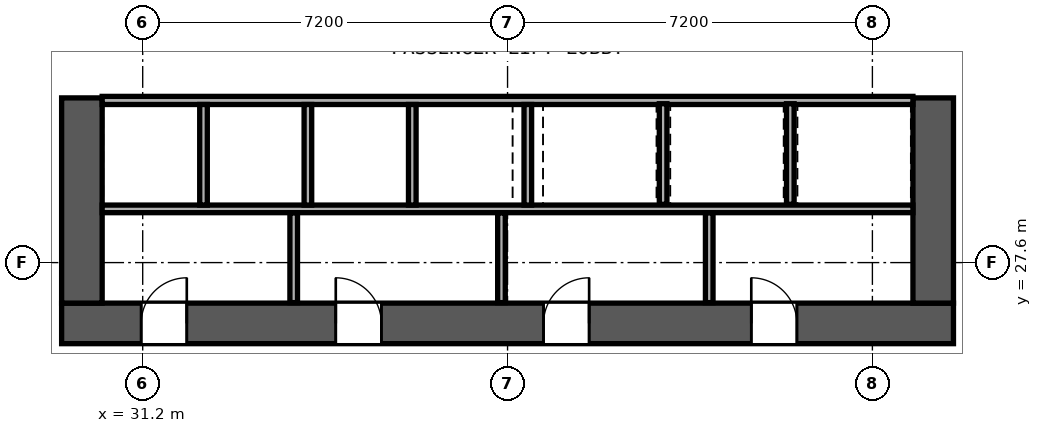
"""IFC4 building model, lengths in metres.
Left out: names, types, materials, properties, quantities, classifications, styles, units other than length and angle.
Written with IfcOpenShell. Run it as: python <this file> out.ifc"""

import sys

from ifc_helpers import new_model, si_unit, direction, frame, frame_2d, origin, place, context, subcontext, project, spatial, rectangle, extrude, element, fill, save


model = new_model("IFC4")
c1 = context("Model", 3, precision=1e-05, world=origin(), true_north=direction((0.0, 1.0)))
c2 = subcontext(c1, "Body", "Model", "MODEL_VIEW")
j1 = project(units=[si_unit("LENGTHUNIT", "METRE"), si_unit("PLANEANGLEUNIT", "RADIAN")], contexts=[c1])
p1 = place(None, origin())
s1 = spatial("IfcSite", under=j1, at=p1, CompositionType="ELEMENT")
p2 = place(p1, origin())
s2 = spatial("IfcBuilding", under=s1, at=p2, CompositionType="ELEMENT")
p3 = place(p2, frame((0.0, 0.0, 15.6)))
s3 = spatial("IfcBuildingStorey", under=s2, at=p3, CompositionType="ELEMENT", Elevation=15.6)
p4 = place(p3, frame((29.6, 26.4, 0.0), z_axis=(0.0, 0.0, 1.0), x_axis=(1.0, 0.0, 0.0)))
e1 = element("IfcWall", 1, at=p4, inside=s3, PredefinedType="SHEAR", context=c2, shape_type="SweptSolid", body=[
    extrude(rectangle(XDim=17.6, YDim=0.8, at=frame_2d((8.8, 0.0))), origin(), (0.0, 0.0, 1.0), 3.78),
])
p5 = place(p4, frame((2.47, 0.0, 0.0), z_axis=(0.0, 0.0, 1.0), x_axis=(-1.0, 0.0, 0.0)))
e2 = element("IfcOpeningElement", 2, at=p5, cuts=e1, PredefinedType="OPENING", context=c2, shape_type="SweptSolid", body=[
    extrude(rectangle(XDim=0.9, YDim=2.1, at=frame_2d((0.45, 1.05))), frame((0.0, 0.41, 0.0), z_axis=(0.0, -1.0, 0.0), x_axis=(1.0, 0.0, 0.0)), (0.0, 0.0, 1.0), 0.82),
])
p6 = place(p4, frame((6.31, 0.0, 0.0), z_axis=(0.0, 0.0, 1.0), x_axis=(-1.0, 0.0, 0.0)))
e3 = element("IfcOpeningElement", 3, at=p6, cuts=e1, PredefinedType="OPENING", context=c2, shape_type="SweptSolid", body=[
    extrude(rectangle(XDim=0.9, YDim=2.1, at=frame_2d((0.45, 1.05))), frame((0.0, 0.41, 0.0), z_axis=(0.0, -1.0, 0.0), x_axis=(1.0, 0.0, 0.0)), (0.0, 0.0, 1.0), 0.82),
])
p7 = place(p4, frame((10.41, 0.0, 0.0), z_axis=(0.0, 0.0, 1.0), x_axis=(-1.0, 0.0, 0.0)))
e4 = element("IfcOpeningElement", 4, at=p7, cuts=e1, PredefinedType="OPENING", context=c2, shape_type="SweptSolid", body=[
    extrude(rectangle(XDim=0.9, YDim=2.1, at=frame_2d((0.45, 1.05))), frame((0.0, 0.41, 0.0), z_axis=(0.0, -1.0, 0.0), x_axis=(1.0, 0.0, 0.0)), (0.0, 0.0, 1.0), 0.82),
])
p8 = place(p4, frame((14.51, 0.0, 0.0), z_axis=(0.0, 0.0, 1.0), x_axis=(-1.0, 0.0, 0.0)))
e5 = element("IfcOpeningElement", 5, at=p8, cuts=e1, PredefinedType="OPENING", context=c2, shape_type="SweptSolid", body=[
    extrude(rectangle(XDim=0.9, YDim=2.1, at=frame_2d((0.45, 1.05))), frame((0.0, 0.41, 0.0), z_axis=(0.0, -1.0, 0.0), x_axis=(1.0, 0.0, 0.0)), (0.0, 0.0, 1.0), 0.82),
])
for number, where, z_axis, x_axis in (
    (6, (30.0, 26.8, 0.0), (0.0, 0.0, 1.0), (0.0, 1.0, 0.0)),
    (7, (46.8, 26.8, 0.0), (0.0, 0.0, 1.0), (0.0, 1.0, 0.0)),
):
    element("IfcWall", number, at=place(p3, frame(where, z_axis=z_axis, x_axis=x_axis)), inside=s3, PredefinedType="SHEAR", context=c2, shape_type="SweptSolid", body=[
        extrude(rectangle(XDim=4.05, YDim=0.8, at=frame_2d((2.025, 0.0))), origin(), (0.0, 0.0, 1.0), 3.78),
    ])
p9 = place(p3, frame((30.4, 30.8, 0.0), z_axis=(0.0, 0.0, 1.0), x_axis=(1.0, 0.0, 0.0)))
e8 = element("IfcWall", 8, at=p9, inside=s3, PredefinedType="SOLIDWALL", context=c2, shape_type="SweptSolid", body=[
    extrude(rectangle(XDim=16.0, YDim=0.16, at=frame_2d((8.0, 0.0))), origin(), (0.0, 0.0, 1.0), 3.78),
])
p10 = place(p3, frame((30.4, 28.66, 0.0), z_axis=(0.0, 0.0, 1.0), x_axis=(1.0, 0.0, 0.0)))
e9 = element("IfcWall", 9, at=p10, inside=s3, PredefinedType="PARTITIONING", context=c2, shape_type="SweptSolid", body=[
    extrude(rectangle(XDim=16.0, YDim=0.15, at=frame_2d((8.0, 0.0))), origin(), (0.0, 0.0, 1.0), 3.78),
])
for number, where, z_axis, x_axis in (
    (10, (32.4, 28.735, 0.0), (0.0, 0.0, 1.0), (0.0, 1.0, 0.0)),
    (11, (34.46, 28.735, 0.0), (0.0, 0.0, 1.0), (0.0, 1.0, 0.0)),
    (12, (36.52, 28.735, 0.0), (0.0, 0.0, 1.0), (0.0, 1.0, 0.0)),
    (13, (38.8, 28.735, 0.0), (0.0, 0.0, 1.0), (0.0, 1.0, 0.0)),
):
    element("IfcWall", number, at=place(p3, frame(where, z_axis=z_axis, x_axis=x_axis)), inside=s3, PredefinedType="SOLIDWALL", context=c2, shape_type="SweptSolid", body=[
        extrude(rectangle(XDim=1.985, YDim=0.15, at=frame_2d((0.992, 0.0))), origin(), (0.0, 0.0, 1.0), 3.78),
    ])
for number, where, z_axis, x_axis in (
    (14, (34.18, 26.81, 0.0), (0.0, 0.0, 1.0), (0.0, 1.0, 0.0)),
    (15, (38.28, 26.81, 0.0), (0.0, 0.0, 1.0), (0.0, 1.0, 0.0)),
    (16, (42.38, 26.81, 0.0), (0.0, 0.0, 1.0), (0.0, 1.0, 0.0)),
):
    element("IfcWall", number, at=place(p3, frame(where, z_axis=z_axis, x_axis=x_axis)), inside=s3, PredefinedType="PARTITIONING", context=c2, shape_type="SweptSolid", body=[
        extrude(rectangle(XDim=1.77, YDim=0.15, at=frame_2d((0.885, 0.0))), origin(), (0.0, 0.0, 1.0), 3.78),
    ])
for number, where, z_axis, x_axis in (
    (17, (41.47, 28.75, 0.0), (0.0, 0.0, 1.0), (0.0, 1.0, 0.0)),
    (18, (43.98, 28.75, 0.0), (0.0, 0.0, 1.0), (0.0, 1.0, 0.0)),
):
    element("IfcWall", number, at=place(p3, frame(where, z_axis=z_axis, x_axis=x_axis)), inside=s3, PredefinedType="SOLIDWALL", context=c2, shape_type="SweptSolid", body=[
        extrude(rectangle(XDim=1.985, YDim=0.15, at=frame_2d((0.993, 0.0))), origin(), (0.0, 0.0, 1.0), 3.78),
    ])
p11 = place(p5, origin())
e19 = element("IfcDoor", 19, at=p11, inside=s3, OperationType="SINGLE_SWING_LEFT", PredefinedType="DOOR", context=c2, shape_type="SweptSolid", body=[
    extrude(rectangle(XDim=0.9, YDim=2.1, at=frame_2d((0.45, 1.05))), frame((0.0, -0.195, 0.0), z_axis=(0.0, -1.0, 0.0), x_axis=(1.0, 0.0, 0.0)), (0.0, 0.0, 1.0), 0.05),
])
fill(e2, e19)
p12 = place(p6, origin())
e20 = element("IfcDoor", 20, at=p12, inside=s3, OperationType="SINGLE_SWING_RIGHT", PredefinedType="DOOR", context=c2, shape_type="SweptSolid", body=[
    extrude(rectangle(XDim=0.9, YDim=2.1, at=frame_2d((0.45, 1.05))), frame((0.0, -0.195, 0.0), z_axis=(0.0, -1.0, 0.0), x_axis=(1.0, 0.0, 0.0)), (0.0, 0.0, 1.0), 0.05),
])
fill(e3, e20)
p13 = place(p7, origin())
e21 = element("IfcDoor", 21, at=p13, inside=s3, OperationType="SINGLE_SWING_LEFT", PredefinedType="DOOR", context=c2, shape_type="SweptSolid", body=[
    extrude(rectangle(XDim=0.9, YDim=2.1, at=frame_2d((0.45, 1.05))), frame((0.0, -0.195, 0.0), z_axis=(0.0, -1.0, 0.0), x_axis=(1.0, 0.0, 0.0)), (0.0, 0.0, 1.0), 0.05),
])
fill(e4, e21)
p14 = place(p8, origin())
e22 = element("IfcDoor", 22, at=p14, inside=s3, OperationType="SINGLE_SWING_RIGHT", PredefinedType="DOOR", context=c2, shape_type="SweptSolid", body=[
    extrude(rectangle(XDim=0.9, YDim=2.1, at=frame_2d((0.45, 1.05))), frame((0.0, -0.195, 0.0), z_axis=(0.0, -1.0, 0.0), x_axis=(1.0, 0.0, 0.0)), (0.0, 0.0, 1.0), 0.05),
])
fill(e5, e22)
save(model, sys.argv[1])
